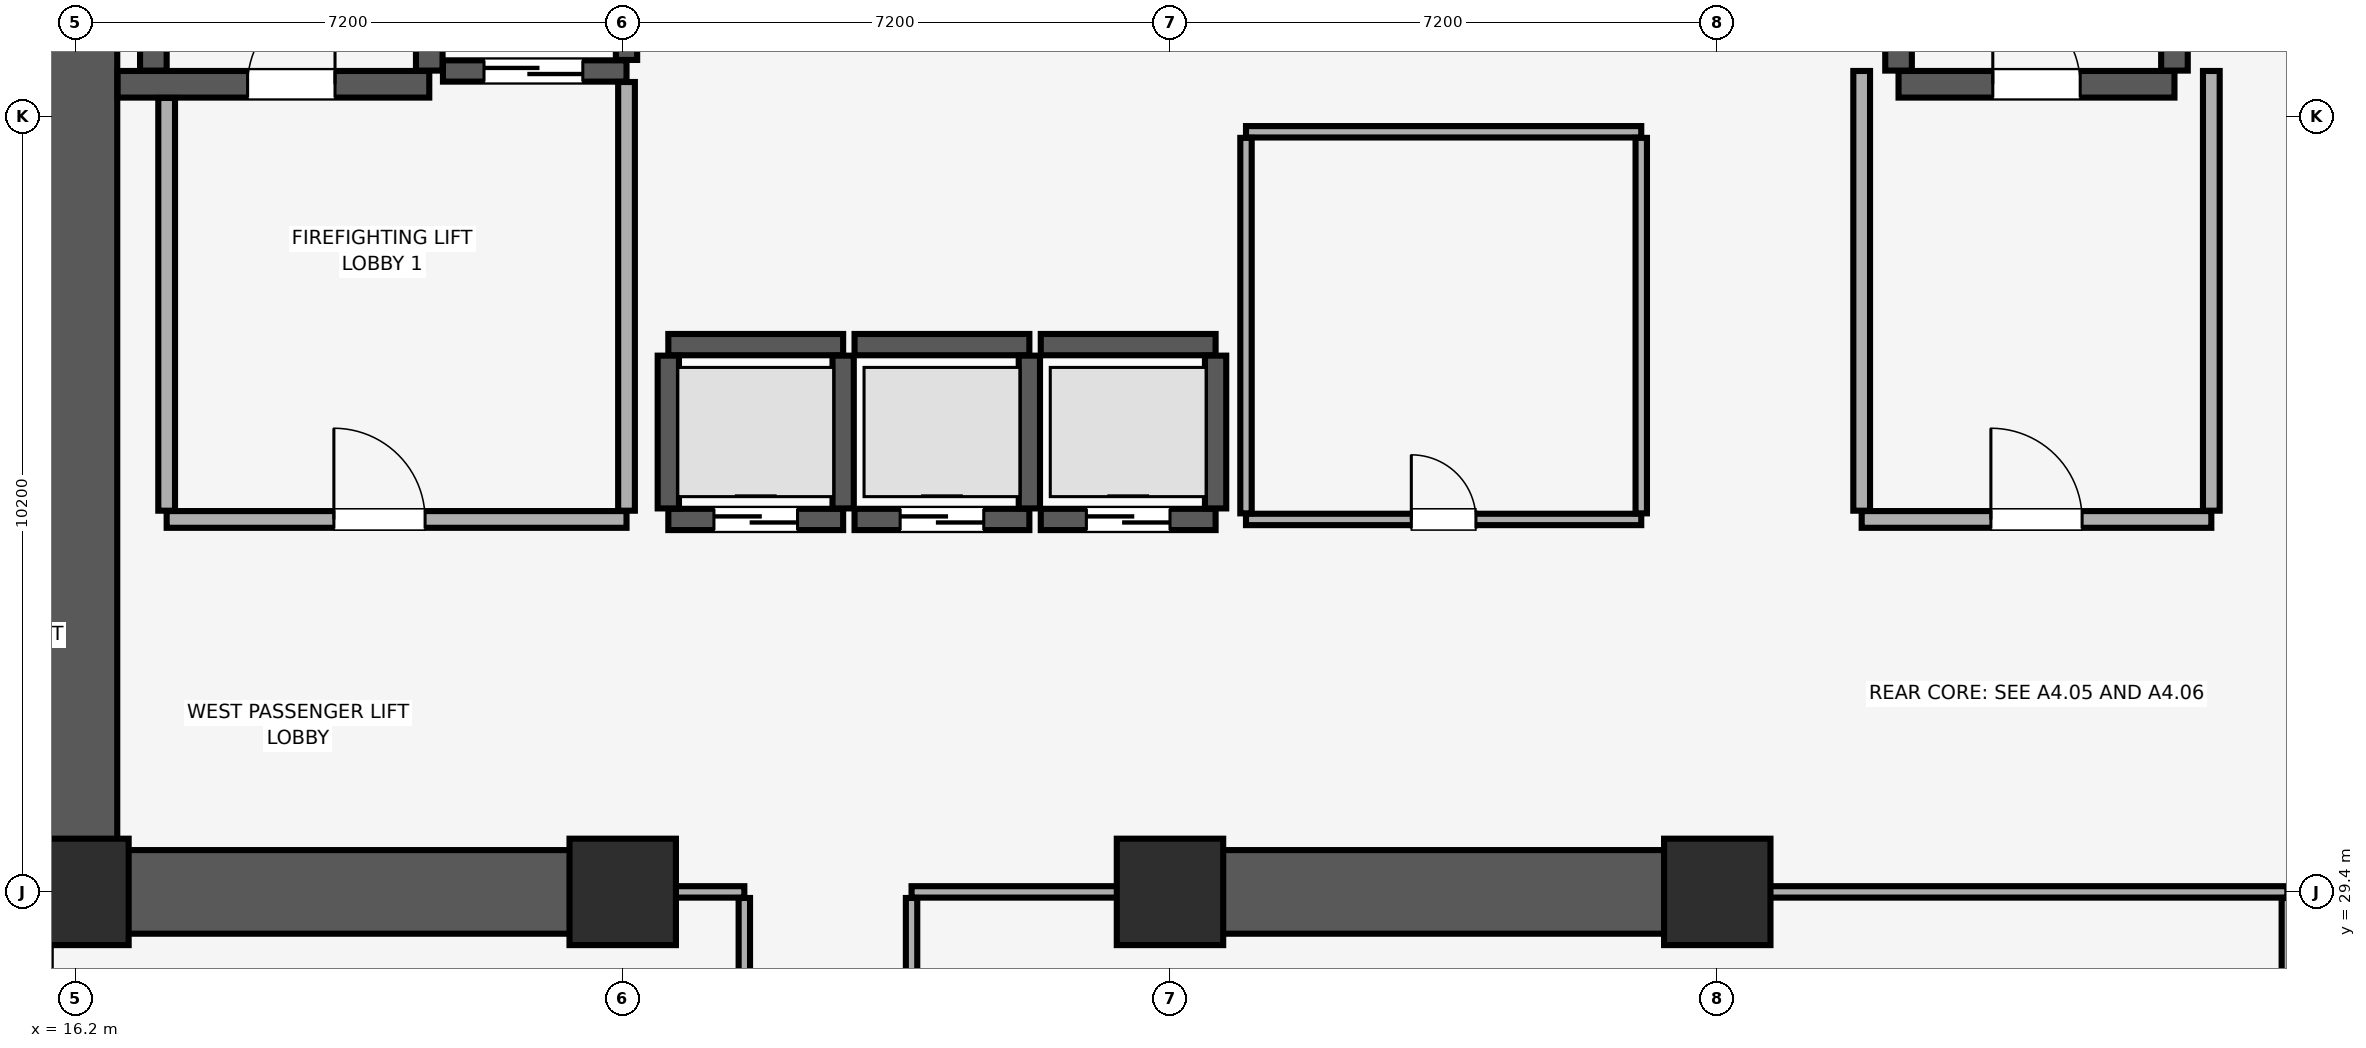
"""IFC4 building model, lengths in metres.
Left out: names, types, materials, properties, quantities, classifications, styles, units other than length and angle.
Written with IfcOpenShell. Run it as: python <this file> out.ifc"""

import sys

from ifc_helpers import new_model, si_unit, direction, frame, frame_2d, origin, origin_2d, place, context, subcontext, project, spatial, rectangle, extrude, element, fill, save


model = new_model("IFC4")
c1 = context("Model", 3, precision=1e-05, world=origin(), true_north=direction((0.0, 1.0)))
c2 = subcontext(c1, "Body", "Model", "MODEL_VIEW")
j1 = project(units=[si_unit("LENGTHUNIT", "METRE"), si_unit("PLANEANGLEUNIT", "RADIAN")], contexts=[c1])
p1 = place(None, origin())
s1 = spatial("IfcSite", under=j1, at=p1, CompositionType="ELEMENT")
p2 = place(p1, origin())
s2 = spatial("IfcBuilding", under=s1, at=p2, CompositionType="ELEMENT")
p3 = place(p2, frame((0.0, 0.0, 68.9)))
s3 = spatial("IfcBuildingStorey", under=s2, at=p3, CompositionType="ELEMENT", Elevation=68.9)
for number, where, z_axis, x_axis in (
    (1, (16.2, 29.4, 0.0), (0.0, 0.0, 1.0), (1.0, 0.0, 0.0)),
    (2, (23.4, 29.4, 0.0), (0.0, 0.0, 1.0), (1.0, 0.0, 0.0)),
    (3, (30.6, 29.4, 0.0), (0.0, 0.0, 1.0), (1.0, 0.0, 0.0)),
    (4, (37.8, 29.4, 0.0), (0.0, 0.0, 1.0), (1.0, 0.0, 0.0)),
):
    element("IfcColumn", number, at=place(p3, frame(where, z_axis=z_axis, x_axis=x_axis)), inside=s3, PredefinedType="COLUMN", context=c2, shape_type="SweptSolid", body=[
        extrude(rectangle(XDim=1.4, YDim=1.4, at=origin_2d()), origin(), (0.0, 0.0, 1.0), 3.51),
    ])
p4 = place(p3, frame((16.2, 29.4, 0.0), z_axis=(0.0, 0.0, 1.0), x_axis=(0.0, 1.0, 0.0)))
e5 = element("IfcWall", 5, at=p4, inside=s3, PredefinedType="SHEAR", context=c2, shape_type="SweptSolid", body=[
    extrude(rectangle(XDim=19.2, YDim=1.1, at=frame_2d((9.6, 0.0))), origin(), (0.0, 0.0, 1.0), 3.51),
])
p5 = place(p3, frame((16.755, 29.4, 0.0), z_axis=(0.0, 0.0, 1.0), x_axis=(1.0, 0.0, 0.0)))
e6 = element("IfcWall", 6, at=p5, inside=s3, PredefinedType="SHEAR", context=c2, shape_type="SweptSolid", body=[
    extrude(rectangle(XDim=6.845, YDim=1.1, at=frame_2d((3.423, 0.0))), origin(), (0.0, 0.0, 1.0), 3.51),
])
p6 = place(p3, frame((30.4, 29.4, 0.0), z_axis=(0.0, 0.0, 1.0), x_axis=(1.0, 0.0, 0.0)))
e7 = element("IfcWall", 7, at=p6, inside=s3, PredefinedType="SHEAR", context=c2, shape_type="SweptSolid", body=[
    extrude(rectangle(XDim=7.6, YDim=1.1, at=frame_2d((3.8, 0.0))), origin(), (0.0, 0.0, 1.0), 3.51),
])
p7 = place(p3, frame((16.755, 40.025, 0.0), z_axis=(0.0, 0.0, 1.0), x_axis=(1.0, 0.0, 0.0)))
e8 = element("IfcWall", 8, at=p7, inside=s3, PredefinedType="SHEAR", context=c2, shape_type="SweptSolid", body=[
    extrude(rectangle(XDim=4.1, YDim=0.35, at=frame_2d((2.05, 0.0))), origin(), (0.0, 0.0, 1.0), 3.51),
])
p8 = place(p7, frame((1.71, 0.0, 0.0)))
e9 = element("IfcOpeningElement", 9, at=p8, cuts=e8, PredefinedType="OPENING", context=c2, shape_type="SweptSolid", body=[
    extrude(rectangle(XDim=1.15, YDim=2.15, at=frame_2d((0.575, 1.075))), frame((0.0, 0.185, 0.0), z_axis=(0.0, -1.0, 0.0), x_axis=(1.0, 0.0, 0.0)), (0.0, 0.0, 1.0), 0.37),
])
for number, where, z_axis, x_axis in (
    (10, (17.225, 40.205, 0.0), (0.0, 0.0, 1.0), (0.0, 1.0, 0.0)),
    (11, (20.855, 40.205, 0.0), (0.0, 0.0, 1.0), (0.0, 1.0, 0.0)),
):
    element("IfcWall", number, at=place(p3, frame(where, z_axis=z_axis, x_axis=x_axis)), inside=s3, PredefinedType="SHEAR", context=c2, shape_type="SweptSolid", body=[
        extrude(rectangle(XDim=8.09, YDim=0.35, at=frame_2d((4.045, 0.0))), origin(), (0.0, 0.0, 1.0), 3.51),
    ])
p9 = place(p3, frame((40.185, 40.025, 0.0), z_axis=(0.0, 0.0, 1.0), x_axis=(1.0, 0.0, 0.0)))
e12 = element("IfcWall", 12, at=p9, inside=s3, PredefinedType="SHEAR", context=c2, shape_type="SweptSolid", body=[
    extrude(rectangle(XDim=3.63, YDim=0.35, at=frame_2d((1.815, 0.0))), origin(), (0.0, 0.0, 1.0), 3.51),
])
p10 = place(p9, frame((1.24, 0.0, 0.0)))
e13 = element("IfcOpeningElement", 13, at=p10, cuts=e12, PredefinedType="OPENING", context=c2, shape_type="SweptSolid", body=[
    extrude(rectangle(XDim=1.15, YDim=2.15, at=frame_2d((0.575, 1.075))), frame((0.0, 0.185, 0.0), z_axis=(0.0, -1.0, 0.0), x_axis=(1.0, 0.0, 0.0)), (0.0, 0.0, 1.0), 0.37),
])
for number, where, z_axis, x_axis in (
    (14, (40.185, 40.205, 0.0), (0.0, 0.0, 1.0), (0.0, 1.0, 0.0)),
    (15, (43.815, 40.205, 0.0), (0.0, 0.0, 1.0), (0.0, 1.0, 0.0)),
):
    element("IfcWall", number, at=place(p3, frame(where, z_axis=z_axis, x_axis=x_axis)), inside=s3, PredefinedType="SHEAR", context=c2, shape_type="SweptSolid", body=[
        extrude(rectangle(XDim=8.09, YDim=0.35, at=frame_2d((4.045, 0.0))), origin(), (0.0, 0.0, 1.0), 3.51),
    ])
p11 = place(p3, frame((24.0, 34.3, 0.0), z_axis=(0.0, 0.0, 1.0), x_axis=(1.0, 0.0, 0.0)))
e16 = element("IfcWall", 16, at=p11, inside=s3, PredefinedType="SHEAR", context=c2, shape_type="SweptSolid", body=[
    extrude(rectangle(XDim=2.3, YDim=0.28, at=frame_2d((1.15, 0.0))), origin(), (0.0, 0.0, 1.0), 3.51),
])
p12 = place(p11, frame((0.6, 0.0, 0.0)))
e17 = element("IfcOpeningElement", 17, at=p12, cuts=e16, PredefinedType="OPENING", context=c2, shape_type="SweptSolid", body=[
    extrude(rectangle(XDim=1.1, YDim=2.2, at=frame_2d((0.55, 1.1))), frame((0.0, 0.15, 0.0), z_axis=(0.0, -1.0, 0.0), x_axis=(1.0, 0.0, 0.0)), (0.0, 0.0, 1.0), 0.3),
])
p13 = place(p3, frame((24.0, 36.6, 0.0), z_axis=(0.0, 0.0, 1.0), x_axis=(1.0, 0.0, 0.0)))
e18 = element("IfcWall", 18, at=p13, inside=s3, PredefinedType="SHEAR", context=c2, shape_type="SweptSolid", body=[
    extrude(rectangle(XDim=2.3, YDim=0.28, at=frame_2d((1.15, 0.0))), origin(), (0.0, 0.0, 1.0), 3.51),
])
for number, where, z_axis, x_axis in (
    (19, (24.0, 34.445, 0.0), (0.0, 0.0, 1.0), (0.0, 1.0, 0.0)),
    (20, (26.3, 34.445, 0.0), (0.0, 0.0, 1.0), (0.0, 1.0, 0.0)),
):
    element("IfcWall", number, at=place(p3, frame(where, z_axis=z_axis, x_axis=x_axis)), inside=s3, PredefinedType="SHEAR", context=c2, shape_type="SweptSolid", body=[
        extrude(rectangle(XDim=2.01, YDim=0.28, at=frame_2d((1.005, 0.0))), origin(), (0.0, 0.0, 1.0), 3.51),
    ])
p14 = place(p3, frame((26.45, 34.3, 0.0), z_axis=(0.0, 0.0, 1.0), x_axis=(1.0, 0.0, 0.0)))
e21 = element("IfcWall", 21, at=p14, inside=s3, PredefinedType="SHEAR", context=c2, shape_type="SweptSolid", body=[
    extrude(rectangle(XDim=2.3, YDim=0.28, at=frame_2d((1.15, 0.0))), origin(), (0.0, 0.0, 1.0), 3.51),
])
p15 = place(p14, frame((0.6, 0.0, 0.0)))
e22 = element("IfcOpeningElement", 22, at=p15, cuts=e21, PredefinedType="OPENING", context=c2, shape_type="SweptSolid", body=[
    extrude(rectangle(XDim=1.1, YDim=2.2, at=frame_2d((0.55, 1.1))), frame((0.0, 0.15, 0.0), z_axis=(0.0, -1.0, 0.0), x_axis=(1.0, 0.0, 0.0)), (0.0, 0.0, 1.0), 0.3),
])
p16 = place(p3, frame((26.45, 36.6, 0.0), z_axis=(0.0, 0.0, 1.0), x_axis=(1.0, 0.0, 0.0)))
e23 = element("IfcWall", 23, at=p16, inside=s3, PredefinedType="SHEAR", context=c2, shape_type="SweptSolid", body=[
    extrude(rectangle(XDim=2.3, YDim=0.28, at=frame_2d((1.15, 0.0))), origin(), (0.0, 0.0, 1.0), 3.51),
])
p17 = place(p3, frame((28.75, 34.445, 0.0), z_axis=(0.0, 0.0, 1.0), x_axis=(0.0, 1.0, 0.0)))
e24 = element("IfcWall", 24, at=p17, inside=s3, PredefinedType="SHEAR", context=c2, shape_type="SweptSolid", body=[
    extrude(rectangle(XDim=2.01, YDim=0.28, at=frame_2d((1.005, 0.0))), origin(), (0.0, 0.0, 1.0), 3.51),
])
p18 = place(p3, frame((28.9, 34.3, 0.0), z_axis=(0.0, 0.0, 1.0), x_axis=(1.0, 0.0, 0.0)))
e25 = element("IfcWall", 25, at=p18, inside=s3, PredefinedType="SHEAR", context=c2, shape_type="SweptSolid", body=[
    extrude(rectangle(XDim=2.3, YDim=0.28, at=frame_2d((1.15, 0.0))), origin(), (0.0, 0.0, 1.0), 3.51),
])
p19 = place(p18, frame((0.6, 0.0, 0.0)))
e26 = element("IfcOpeningElement", 26, at=p19, cuts=e25, PredefinedType="OPENING", context=c2, shape_type="SweptSolid", body=[
    extrude(rectangle(XDim=1.1, YDim=2.2, at=frame_2d((0.55, 1.1))), frame((0.0, 0.15, 0.0), z_axis=(0.0, -1.0, 0.0), x_axis=(1.0, 0.0, 0.0)), (0.0, 0.0, 1.0), 0.3),
])
p20 = place(p3, frame((28.9, 36.6, 0.0), z_axis=(0.0, 0.0, 1.0), x_axis=(1.0, 0.0, 0.0)))
e27 = element("IfcWall", 27, at=p20, inside=s3, PredefinedType="SHEAR", context=c2, shape_type="SweptSolid", body=[
    extrude(rectangle(XDim=2.3, YDim=0.28, at=frame_2d((1.15, 0.0))), origin(), (0.0, 0.0, 1.0), 3.51),
])
p21 = place(p3, frame((31.2, 34.445, 0.0), z_axis=(0.0, 0.0, 1.0), x_axis=(0.0, 1.0, 0.0)))
e28 = element("IfcWall", 28, at=p21, inside=s3, PredefinedType="SHEAR", context=c2, shape_type="SweptSolid", body=[
    extrude(rectangle(XDim=2.01, YDim=0.28, at=frame_2d((1.005, 0.0))), origin(), (0.0, 0.0, 1.0), 3.51),
])
p22 = place(p3, frame((21.035, 40.2, 0.0), z_axis=(0.0, 0.0, 1.0), x_axis=(1.0, 0.0, 0.0)))
e29 = element("IfcWall", 29, at=p22, inside=s3, PredefinedType="SHEAR", context=c2, shape_type="SweptSolid", body=[
    extrude(rectangle(XDim=2.415, YDim=0.28, at=frame_2d((1.208, 0.0))), origin(), (0.0, 0.0, 1.0), 3.51),
])
p23 = place(p22, frame((0.54, 0.0, 0.0)))
e30 = element("IfcOpeningElement", 30, at=p23, cuts=e29, PredefinedType="OPENING", context=c2, shape_type="SweptSolid", body=[
    extrude(rectangle(XDim=1.3, YDim=2.3, at=frame_2d((0.65, 1.15))), frame((0.0, 0.15, 0.0), z_axis=(0.0, -1.0, 0.0), x_axis=(1.0, 0.0, 0.0)), (0.0, 0.0, 1.0), 0.3),
])
p24 = place(p3, frame((23.45, 40.345, 0.0), z_axis=(0.0, 0.0, 1.0), x_axis=(0.0, 1.0, 0.0)))
e31 = element("IfcWall", 31, at=p24, inside=s3, PredefinedType="SHEAR", context=c2, shape_type="SweptSolid", body=[
    extrude(rectangle(XDim=2.81, YDim=0.28, at=frame_2d((1.405, 0.0))), origin(), (0.0, 0.0, 1.0), 3.51),
])
p25 = place(p3, frame((17.4, 34.3, 0.0), z_axis=(0.0, 0.0, 1.0), x_axis=(1.0, 0.0, 0.0)))
e32 = element("IfcWall", 32, at=p25, inside=s3, PredefinedType="PARTITIONING", context=c2, shape_type="SweptSolid", body=[
    extrude(rectangle(XDim=6.05, YDim=0.22, at=frame_2d((3.025, 0.0))), origin(), (0.0, 0.0, 1.0), 3.51),
])
p26 = place(p25, frame((2.2, 0.0, 0.0)))
e33 = element("IfcOpeningElement", 33, at=p26, cuts=e32, PredefinedType="OPENING", context=c2, shape_type="SweptSolid", body=[
    extrude(rectangle(XDim=1.2, YDim=2.15, at=frame_2d((0.6, 1.075))), frame((0.0, 0.12, 0.0), z_axis=(0.0, -1.0, 0.0), x_axis=(1.0, 0.0, 0.0)), (0.0, 0.0, 1.0), 0.24),
])
p27 = place(p3, frame((17.4, 34.415, 0.0), z_axis=(0.0, 0.0, 1.0), x_axis=(0.0, 1.0, 0.0)))
e34 = element("IfcWall", 34, at=p27, inside=s3, PredefinedType="PARTITIONING", context=c2, shape_type="SweptSolid", body=[
    extrude(rectangle(XDim=5.43, YDim=0.22, at=frame_2d((2.715, 0.0))), origin(), (0.0, 0.0, 1.0), 3.51),
])
p28 = place(p3, frame((23.45, 34.415, 0.0), z_axis=(0.0, 0.0, 1.0), x_axis=(0.0, 1.0, 0.0)))
e35 = element("IfcWall", 35, at=p28, inside=s3, PredefinedType="PARTITIONING", context=c2, shape_type="SweptSolid", body=[
    extrude(rectangle(XDim=5.64, YDim=0.22, at=frame_2d((2.82, 0.0))), origin(), (0.0, 0.0, 1.0), 3.51),
])
p29 = place(p3, frame((39.7, 34.3, 0.0), z_axis=(0.0, 0.0, 1.0), x_axis=(1.0, 0.0, 0.0)))
e36 = element("IfcWall", 36, at=p29, inside=s3, PredefinedType="PARTITIONING", context=c2, shape_type="SweptSolid", body=[
    extrude(rectangle(XDim=4.6, YDim=0.22, at=frame_2d((2.3, 0.0))), origin(), (0.0, 0.0, 1.0), 3.51),
])
p30 = place(p29, frame((1.7, 0.0, 0.0)))
e37 = element("IfcOpeningElement", 37, at=p30, cuts=e36, PredefinedType="OPENING", context=c2, shape_type="SweptSolid", body=[
    extrude(rectangle(XDim=1.2, YDim=2.15, at=frame_2d((0.6, 1.075))), frame((0.0, 0.12, 0.0), z_axis=(0.0, -1.0, 0.0), x_axis=(1.0, 0.0, 0.0)), (0.0, 0.0, 1.0), 0.24),
])
for number, where, z_axis, x_axis in (
    (38, (39.7, 34.415, 0.0), (0.0, 0.0, 1.0), (0.0, 1.0, 0.0)),
    (39, (44.3, 34.415, 0.0), (0.0, 0.0, 1.0), (0.0, 1.0, 0.0)),
):
    element("IfcWall", number, at=place(p3, frame(where, z_axis=z_axis, x_axis=x_axis)), inside=s3, PredefinedType="PARTITIONING", context=c2, shape_type="SweptSolid", body=[
        extrude(rectangle(XDim=5.785, YDim=0.22, at=frame_2d((2.893, 0.0))), origin(), (0.0, 0.0, 1.0), 3.51),
    ])
p31 = place(p3, frame((31.6, 34.3, 0.0), z_axis=(0.0, 0.0, 1.0), x_axis=(1.0, 0.0, 0.0)))
e40 = element("IfcWall", 40, at=p31, inside=s3, PredefinedType="PARTITIONING", context=c2, shape_type="SweptSolid", body=[
    extrude(rectangle(XDim=5.2, YDim=0.15, at=frame_2d((2.6, 0.0))), origin(), (0.0, 0.0, 1.0), 3.51),
])
p32 = place(p31, frame((2.175, 0.0, 0.0)))
e41 = element("IfcOpeningElement", 41, at=p32, cuts=e40, PredefinedType="OPENING", context=c2, shape_type="SweptSolid", body=[
    extrude(rectangle(XDim=0.85, YDim=2.1, at=frame_2d((0.425, 1.05))), frame((0.0, 0.085, 0.0), z_axis=(0.0, -1.0, 0.0), x_axis=(1.0, 0.0, 0.0)), (0.0, 0.0, 1.0), 0.17),
])
p33 = place(p3, frame((31.6, 39.4, 0.0), z_axis=(0.0, 0.0, 1.0), x_axis=(1.0, 0.0, 0.0)))
e42 = element("IfcWall", 42, at=p33, inside=s3, PredefinedType="PARTITIONING", context=c2, shape_type="SweptSolid", body=[
    extrude(rectangle(XDim=5.2, YDim=0.15, at=frame_2d((2.6, 0.0))), origin(), (0.0, 0.0, 1.0), 3.51),
])
for number, where, z_axis, x_axis in (
    (43, (31.6, 34.38, 0.0), (0.0, 0.0, 1.0), (0.0, 1.0, 0.0)),
    (44, (36.8, 34.38, 0.0), (0.0, 0.0, 1.0), (0.0, 1.0, 0.0)),
):
    element("IfcWall", number, at=place(p3, frame(where, z_axis=z_axis, x_axis=x_axis)), inside=s3, PredefinedType="PARTITIONING", context=c2, shape_type="SweptSolid", body=[
        extrude(rectangle(XDim=4.94, YDim=0.15, at=frame_2d((2.47, 0.0))), origin(), (0.0, 0.0, 1.0), 3.51),
    ])
p34 = place(p3, frame((23.61, 29.4, 0.0), z_axis=(0.0, 0.0, 1.0), x_axis=(1.0, 0.0, 0.0)))
e45 = element("IfcWall", 45, at=p34, inside=s3, PredefinedType="PARTITIONING", context=c2, shape_type="SweptSolid", body=[
    extrude(rectangle(XDim=1.39, YDim=0.15, at=frame_2d((0.695, 0.0))), origin(), (0.0, 0.0, 1.0), 2.41),
])
p35 = place(p3, frame((25.0, 14.93, 0.0), z_axis=(0.0, 0.0, 1.0), x_axis=(0.0, 1.0, 0.0)))
e46 = element("IfcWall", 46, at=p35, inside=s3, PredefinedType="PARTITIONING", context=c2, shape_type="SweptSolid", body=[
    extrude(rectangle(XDim=14.39, YDim=0.15, at=frame_2d((7.195, 0.0))), origin(), (0.0, 0.0, 1.0), 3.51),
])
p36 = place(p3, frame((27.2, 29.4, 0.0), z_axis=(0.0, 0.0, 1.0), x_axis=(1.0, 0.0, 0.0)))
e47 = element("IfcWall", 47, at=p36, inside=s3, PredefinedType="PARTITIONING", context=c2, shape_type="SweptSolid", body=[
    extrude(rectangle(XDim=3.19, YDim=0.15, at=frame_2d((1.595, 0.0))), origin(), (0.0, 0.0, 1.0), 2.41),
])
p37 = place(p3, frame((38.01, 29.4, 0.0), z_axis=(0.0, 0.0, 1.0), x_axis=(1.0, 0.0, 0.0)))
e48 = element("IfcWall", 48, at=p37, inside=s3, PredefinedType="PARTITIONING", context=c2, shape_type="SweptSolid", body=[
    extrude(rectangle(XDim=7.29, YDim=0.15, at=frame_2d((3.645, 0.0))), origin(), (0.0, 0.0, 1.0), 2.41),
])
p38 = place(p3, frame((27.2, 14.93, 0.0), z_axis=(0.0, 0.0, 1.0), x_axis=(0.0, 1.0, 0.0)))
e49 = element("IfcWall", 49, at=p38, inside=s3, PredefinedType="PARTITIONING", context=c2, shape_type="SweptSolid", body=[
    extrude(rectangle(XDim=14.39, YDim=0.15, at=frame_2d((7.195, 0.0))), origin(), (0.0, 0.0, 1.0), 2.977),
])
p39 = place(p3, frame((45.3, 14.93, 0.0), z_axis=(0.0, 0.0, 1.0), x_axis=(0.0, 1.0, 0.0)))
e50 = element("IfcWall", 50, at=p39, inside=s3, PredefinedType="PARTITIONING", context=c2, shape_type="SweptSolid", body=[
    extrude(rectangle(XDim=14.39, YDim=0.15, at=frame_2d((7.195, 0.0))), origin(), (0.0, 0.0, 1.0), 3.51),
])
p40 = place(p8, origin())
e51 = element("IfcDoor", 51, at=p40, inside=s3, OperationType="SINGLE_SWING_RIGHT", PredefinedType="DOOR", context=c2, shape_type="SweptSolid", body=[
    extrude(rectangle(XDim=1.15, YDim=2.15, at=frame_2d((0.575, 1.075))), frame((0.0, 0.025, 0.0), z_axis=(0.0, -1.0, 0.0), x_axis=(1.0, 0.0, 0.0)), (0.0, 0.0, 1.0), 0.05),
])
fill(e9, e51)
p41 = place(p10, origin())
e52 = element("IfcDoor", 52, at=p41, inside=s3, OperationType="SINGLE_SWING_LEFT", PredefinedType="DOOR", context=c2, shape_type="SweptSolid", body=[
    extrude(rectangle(XDim=1.15, YDim=2.15, at=frame_2d((0.575, 1.075))), frame((0.0, 0.025, 0.0), z_axis=(0.0, -1.0, 0.0), x_axis=(1.0, 0.0, 0.0)), (0.0, 0.0, 1.0), 0.05),
])
fill(e13, e52)
p42 = place(p12, origin())
e53 = element("IfcDoor", 53, at=p42, inside=s3, OperationType="DOUBLE_DOOR_SLIDING", PredefinedType="DOOR", context=c2, shape_type="SweptSolid", body=[
    extrude(rectangle(XDim=1.1, YDim=2.2, at=frame_2d((0.55, 1.1))), frame((0.0, 0.025, 0.0), z_axis=(0.0, -1.0, 0.0), x_axis=(1.0, 0.0, 0.0)), (0.0, 0.0, 1.0), 0.05),
])
fill(e17, e53)
p43 = place(p15, origin())
e54 = element("IfcDoor", 54, at=p43, inside=s3, OperationType="DOUBLE_DOOR_SLIDING", PredefinedType="DOOR", context=c2, shape_type="SweptSolid", body=[
    extrude(rectangle(XDim=1.1, YDim=2.2, at=frame_2d((0.55, 1.1))), frame((0.0, 0.025, 0.0), z_axis=(0.0, -1.0, 0.0), x_axis=(1.0, 0.0, 0.0)), (0.0, 0.0, 1.0), 0.05),
])
fill(e22, e54)
p44 = place(p19, origin())
e55 = element("IfcDoor", 55, at=p44, inside=s3, OperationType="DOUBLE_DOOR_SLIDING", PredefinedType="DOOR", context=c2, shape_type="SweptSolid", body=[
    extrude(rectangle(XDim=1.1, YDim=2.2, at=frame_2d((0.55, 1.1))), frame((0.0, 0.025, 0.0), z_axis=(0.0, -1.0, 0.0), x_axis=(1.0, 0.0, 0.0)), (0.0, 0.0, 1.0), 0.05),
])
fill(e26, e55)
p45 = place(p23, origin())
e56 = element("IfcDoor", 56, at=p45, inside=s3, OperationType="DOUBLE_DOOR_SLIDING", PredefinedType="DOOR", context=c2, shape_type="SweptSolid", body=[
    extrude(rectangle(XDim=1.3, YDim=2.3, at=frame_2d((0.65, 1.15))), frame((0.0, 0.025, 0.0), z_axis=(0.0, -1.0, 0.0), x_axis=(1.0, 0.0, 0.0)), (0.0, 0.0, 1.0), 0.05),
])
fill(e30, e56)
p46 = place(p26, origin())
e57 = element("IfcDoor", 57, at=p46, inside=s3, OperationType="SINGLE_SWING_LEFT", PredefinedType="DOOR", context=c2, shape_type="SweptSolid", body=[
    extrude(rectangle(XDim=1.2, YDim=2.15, at=frame_2d((0.6, 1.075))), frame((0.0, 0.025, 0.0), z_axis=(0.0, -1.0, 0.0), x_axis=(1.0, 0.0, 0.0)), (0.0, 0.0, 1.0), 0.05),
])
fill(e33, e57)
p47 = place(p30, origin())
e58 = element("IfcDoor", 58, at=p47, inside=s3, OperationType="SINGLE_SWING_LEFT", PredefinedType="DOOR", context=c2, shape_type="SweptSolid", body=[
    extrude(rectangle(XDim=1.2, YDim=2.15, at=frame_2d((0.6, 1.075))), frame((0.0, 0.025, 0.0), z_axis=(0.0, -1.0, 0.0), x_axis=(1.0, 0.0, 0.0)), (0.0, 0.0, 1.0), 0.05),
])
fill(e37, e58)
p48 = place(p32, origin())
e59 = element("IfcDoor", 59, at=p48, inside=s3, OperationType="SINGLE_SWING_LEFT", PredefinedType="DOOR", context=c2, shape_type="SweptSolid", body=[
    extrude(rectangle(XDim=0.85, YDim=2.1, at=frame_2d((0.425, 1.05))), frame((0.0, 0.025, 0.0), z_axis=(0.0, -1.0, 0.0), x_axis=(1.0, 0.0, 0.0)), (0.0, 0.0, 1.0), 0.05),
])
fill(e41, e59)
save(model, sys.argv[1])
